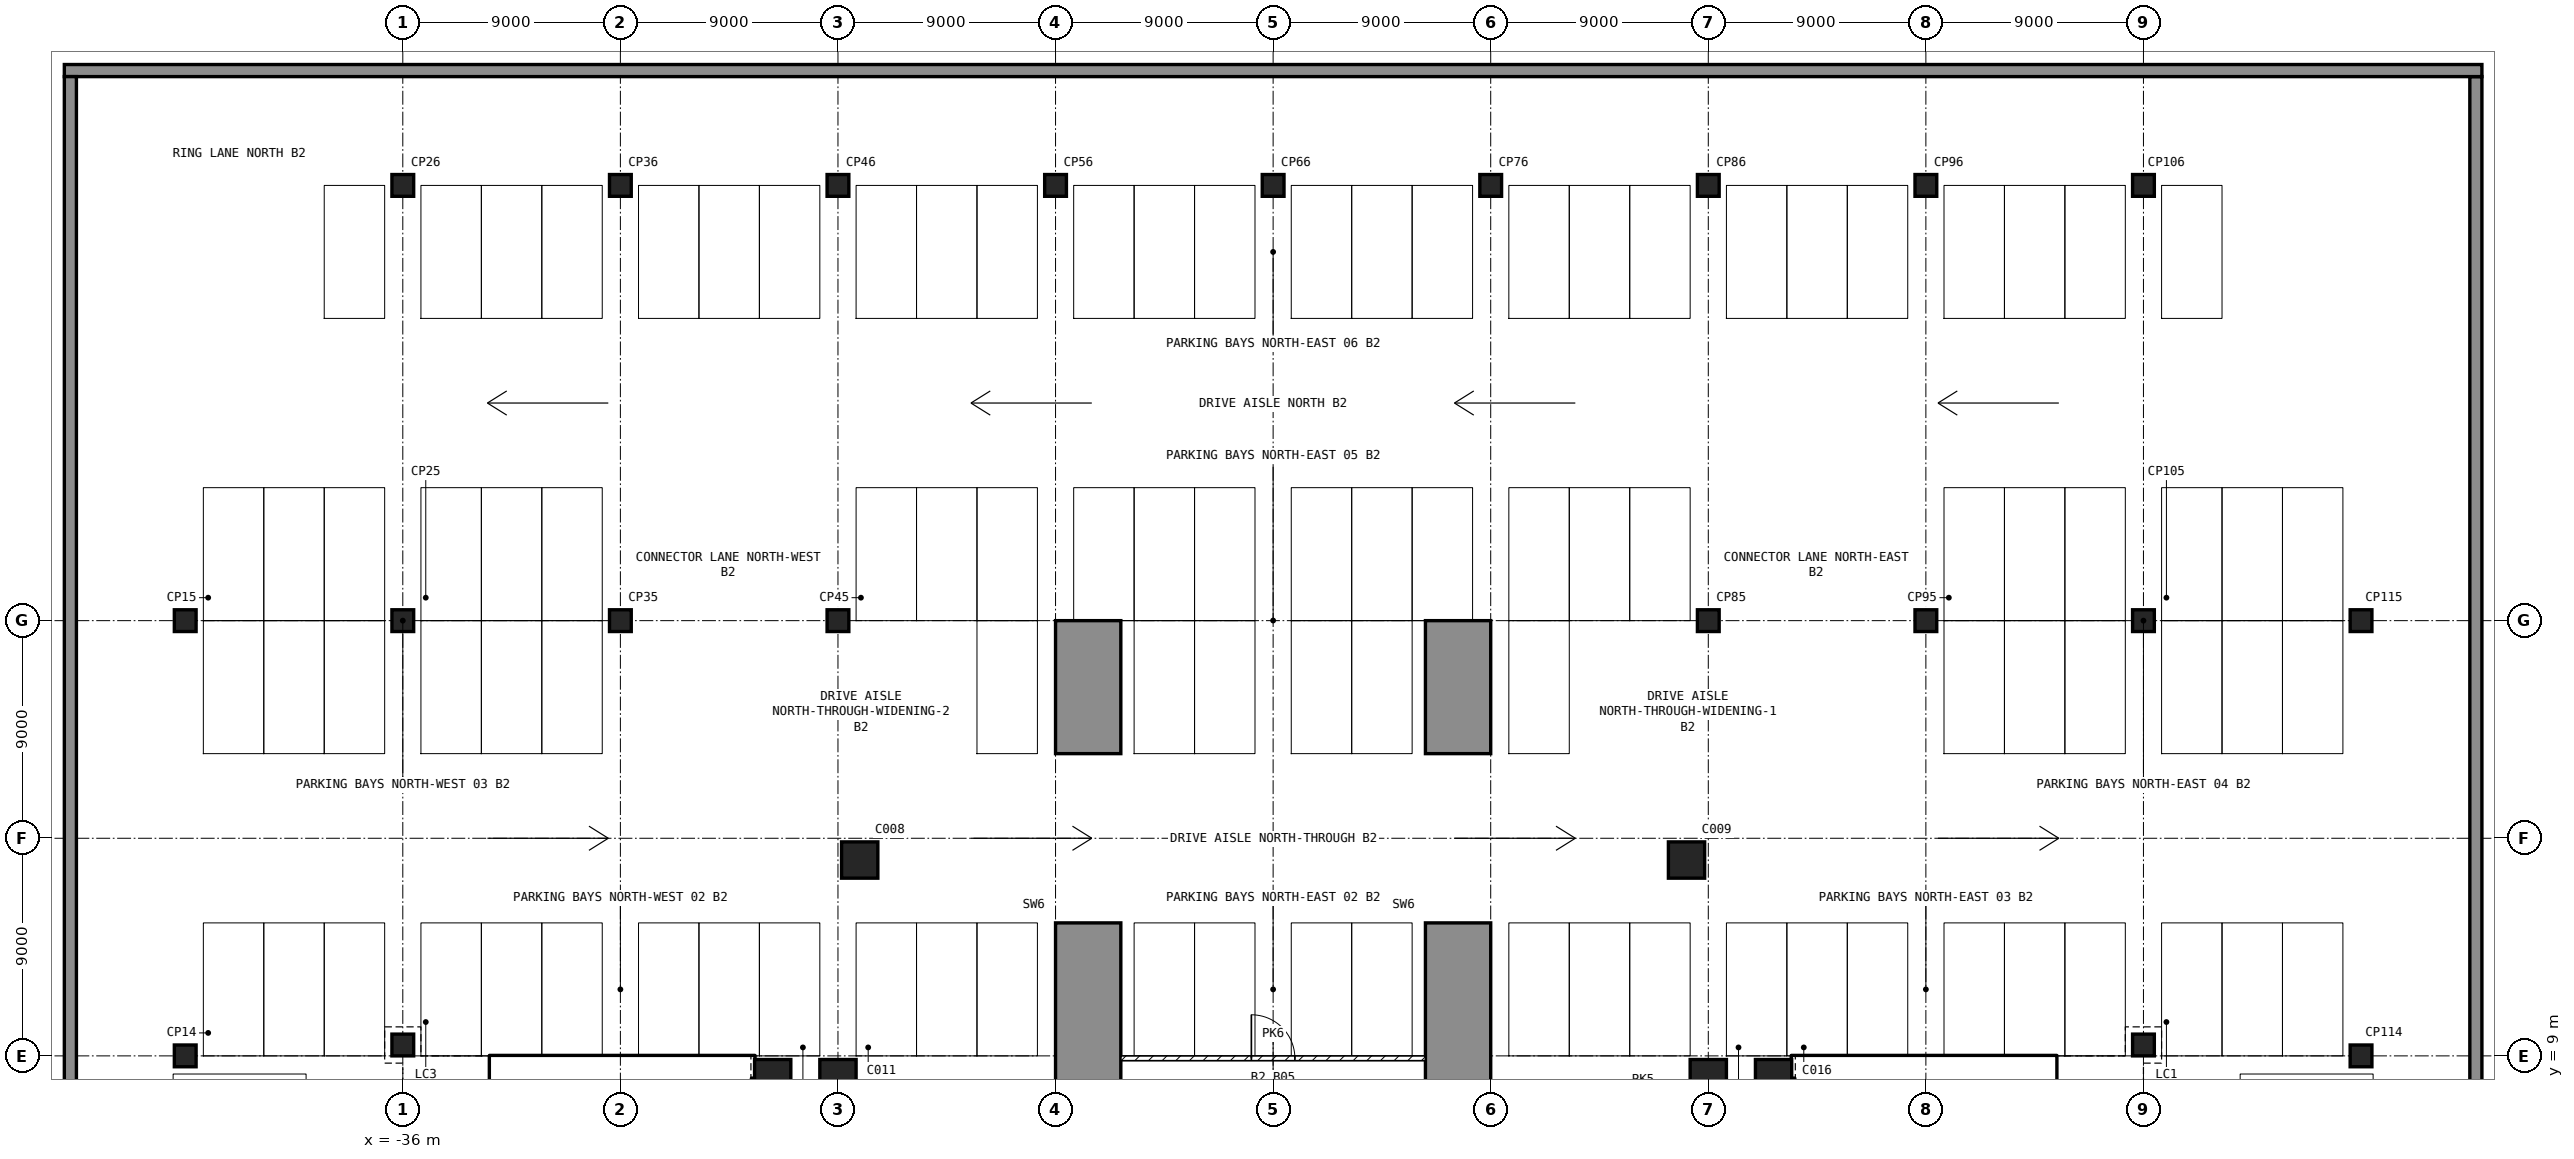
"""IFC4 building model, lengths in metres.
Left out: names, types, materials, properties, quantities, classifications, styles, units other than length and angle.
Written with IfcOpenShell. Run it as: python <this file> out.ifc"""

import sys

from ifc_helpers import new_model, si_unit, direction, frame, frame_2d, origin, origin_2d, place, context, subcontext, project, spatial, polyline, rectangle, outline, extrude, element, fill, save


model = new_model("IFC4")
c1 = context("Model", 3, precision=1e-05, world=origin(), true_north=direction((0.0, 1.0)))
c2 = subcontext(c1, "Body", "Model", "MODEL_VIEW")
j1 = project(units=[si_unit("LENGTHUNIT", "METRE"), si_unit("PLANEANGLEUNIT", "RADIAN")], contexts=[c1])
p1 = place(None, origin())
s1 = spatial("IfcSite", under=j1, at=p1, CompositionType="ELEMENT")
p2 = place(p1, origin())
s2 = spatial("IfcBuilding", under=s1, at=p2, CompositionType="ELEMENT")
p3 = place(p2, frame((0.0, 0.0, -8.7)))
s3 = spatial("IfcBuildingStorey", under=s2, at=p3, CompositionType="ELEMENT", Elevation=-8.7)
p4 = place(p3, frame((-50.0, 49.75, -0.3), z_axis=(0.0, 0.0, 1.0), x_axis=(1.0, 0.0, 0.0)))
e1 = element("IfcWall", 1, at=p4, inside=s3, PredefinedType="SOLIDWALL", context=c2, shape_type="SweptSolid", body=[
    extrude(rectangle(XDim=100.0, YDim=0.5, at=frame_2d((50.0, 0.0))), origin(), (0.0, 0.0, 1.0), 4.2),
])
for number, where, z_axis, x_axis in (
    (2, (49.75, -49.5, -0.3), (0.0, 0.0, 1.0), (0.0, 1.0, 0.0)),
    (3, (-49.75, -49.5, -0.3), (0.0, 0.0, 1.0), (0.0, 1.0, 0.0)),
):
    element("IfcWall", number, at=place(p3, frame(where, z_axis=z_axis, x_axis=x_axis)), inside=s3, PredefinedType="SOLIDWALL", context=c2, shape_type="SweptSolid", body=[
        extrude(rectangle(XDim=99.0, YDim=0.5, at=frame_2d((49.5, 0.0))), origin(), (0.0, 0.0, 1.0), 4.2),
    ])
for number, where, z_axis, x_axis in (
    (4, (-20.7, 8.1, -0.3), (0.0, 0.0, 1.0), (1.0, 0.0, 0.0)),
    (5, (-18.0, 8.1, -0.3), (0.0, 0.0, 1.0), (1.0, 0.0, 0.0)),
    (6, (18.0, 8.1, -0.3), (0.0, 0.0, 1.0), (1.0, 0.0, 0.0)),
    (7, (20.7, 8.1, -0.3), (0.0, 0.0, 1.0), (1.0, 0.0, 0.0)),
    (8, (17.1, 17.1, -0.3), (0.0, 0.0, 1.0), (1.0, 0.0, 0.0)),
    (9, (-17.1, 17.1, -0.3), (0.0, 0.0, 1.0), (1.0, 0.0, 0.0)),
):
    element("IfcColumn", number, at=place(p3, frame(where, z_axis=z_axis, x_axis=x_axis)), inside=s3, PredefinedType="COLUMN", context=c2, shape_type="SweptSolid", body=[
        extrude(rectangle(XDim=1.5, YDim=1.5, at=origin_2d()), origin(), (0.0, 0.0, 1.0), 4.2),
    ])
for number, where, z_axis, x_axis in (
    (10, (-45.0, 9.0, -0.3), (0.0, 0.0, 1.0), (1.0, 0.0, 0.0)),
    (11, (-45.0, 27.0, -0.3), (0.0, 0.0, 1.0), (1.0, 0.0, 0.0)),
    (12, (-36.0, 27.0, -0.3), (0.0, 0.0, 1.0), (1.0, 0.0, 0.0)),
    (13, (-36.0, 45.0, -0.3), (0.0, 0.0, 1.0), (1.0, 0.0, 0.0)),
    (14, (-27.0, 27.0, -0.3), (0.0, 0.0, 1.0), (1.0, 0.0, 0.0)),
    (15, (-27.0, 45.0, -0.3), (0.0, 0.0, 1.0), (1.0, 0.0, 0.0)),
    (16, (-18.0, 27.0, -0.3), (0.0, 0.0, 1.0), (1.0, 0.0, 0.0)),
    (17, (-18.0, 45.0, -0.3), (0.0, 0.0, 1.0), (1.0, 0.0, 0.0)),
    (18, (-9.0, 45.0, -0.3), (0.0, 0.0, 1.0), (1.0, 0.0, 0.0)),
    (19, (0.0, 45.0, -0.3), (0.0, 0.0, 1.0), (1.0, 0.0, 0.0)),
    (20, (9.0, 45.0, -0.3), (0.0, 0.0, 1.0), (1.0, 0.0, 0.0)),
    (21, (18.0, 27.0, -0.3), (0.0, 0.0, 1.0), (1.0, 0.0, 0.0)),
    (22, (18.0, 45.0, -0.3), (0.0, 0.0, 1.0), (1.0, 0.0, 0.0)),
    (23, (27.0, 27.0, -0.3), (0.0, 0.0, 1.0), (1.0, 0.0, 0.0)),
    (24, (27.0, 45.0, -0.3), (0.0, 0.0, 1.0), (1.0, 0.0, 0.0)),
    (25, (36.0, 27.0, -0.3), (0.0, 0.0, 1.0), (1.0, 0.0, 0.0)),
    (26, (36.0, 45.0, -0.3), (0.0, 0.0, 1.0), (1.0, 0.0, 0.0)),
    (27, (45.0, 9.0, -0.3), (0.0, 0.0, 1.0), (1.0, 0.0, 0.0)),
    (28, (45.0, 27.0, -0.3), (0.0, 0.0, 1.0), (1.0, 0.0, 0.0)),
    (29, (36.0, 9.45, -0.3), (0.0, 0.0, 1.0), (1.0, 0.0, 0.0)),
    (30, (-36.0, 9.45, -0.3), (0.0, 0.0, 1.0), (1.0, 0.0, 0.0)),
):
    element("IfcColumn", number, at=place(p3, frame(where, z_axis=z_axis, x_axis=x_axis)), inside=s3, PredefinedType="COLUMN", context=c2, shape_type="SweptSolid", body=[
        extrude(rectangle(XDim=0.9, YDim=0.9, at=origin_2d()), origin(), (0.0, 0.0, 1.0), 4.2),
    ])
for number, where, z_axis, x_axis in (
    (31, (6.3, 3.5, -0.3), (1.0, 0.0, 0.0), (0.0, 1.0, 0.0)),
    (32, (-9.0, 3.5, -0.3), (1.0, 0.0, 0.0), (0.0, 1.0, 0.0)),
):
    element("IfcWall", number, at=place(p3, frame(where, z_axis=z_axis, x_axis=x_axis)), inside=s3, PredefinedType="SOLIDWALL", context=c2, shape_type="SweptSolid", body=[
        extrude(outline(polyline([(0.0, 0.0), (11.0, 0.0), (11.0, 3.3), (18.0, 3.3), (18.0, 0.0), (23.5, 0.0), (23.5, 4.2), (0.0, 4.2), (0.0, 0.0)])), origin(), (0.0, 0.0, 1.0), 2.7),
    ])
p5 = place(p3, frame((31.95, 7.2, 0.0), z_axis=(0.0, 0.0, 1.0), x_axis=(0.0, 1.0, 0.0)))
e33 = element("IfcWall", 33, at=p5, inside=s3, PredefinedType="SHEAR", context=c2, shape_type="SweptSolid", body=[
    extrude(rectangle(XDim=1.8, YDim=0.9, at=frame_2d((0.9, 0.0))), origin(), (0.0, 0.0, 1.0), 3.9),
])
p6 = place(p3, frame((21.45, 8.55, 0.0), z_axis=(0.0, 0.0, 1.0), x_axis=(1.0, 0.0, 0.0)))
e34 = element("IfcWall", 34, at=p6, inside=s3, PredefinedType="SHEAR", context=c2, shape_type="SweptSolid", body=[
    extrude(rectangle(XDim=10.05, YDim=0.9, at=frame_2d((5.025, 0.0))), origin(), (0.0, 0.0, 1.0), 3.9),
])
p7 = place(p3, frame((21.825, 1.2, 0.0), z_axis=(0.0, 0.0, 1.0), x_axis=(0.0, 1.0, 0.0)))
e35 = element("IfcWall", 35, at=p7, inside=s3, PredefinedType="SHEAR", context=c2, shape_type="SweptSolid", body=[
    extrude(rectangle(XDim=6.9, YDim=0.45, at=frame_2d((3.45, 0.0))), origin(), (0.0, 0.0, 1.0), 3.9),
])
p8 = place(p3, frame((28.25, 5.25, 0.0), z_axis=(0.0, 0.0, 1.0), x_axis=(0.0, 1.0, 0.0)))
e36 = element("IfcWall", 36, at=p8, inside=s3, PredefinedType="SOLIDWALL", context=c2, shape_type="SweptSolid", body=[
    extrude(rectangle(XDim=2.85, YDim=0.2, at=frame_2d((1.425, 0.0))), origin(), (0.0, 0.0, 1.0), 3.9),
])
p9 = place(p3, frame((-31.95, 7.2, 0.0), z_axis=(0.0, 0.0, 1.0), x_axis=(0.0, 1.0, 0.0)))
e37 = element("IfcWall", 37, at=p9, inside=s3, PredefinedType="SHEAR", context=c2, shape_type="SweptSolid", body=[
    extrude(rectangle(XDim=1.8, YDim=0.9, at=frame_2d((0.9, 0.0))), origin(), (0.0, 0.0, 1.0), 3.9),
])
p10 = place(p3, frame((-31.5, 8.55, 0.0), z_axis=(0.0, 0.0, 1.0), x_axis=(1.0, 0.0, 0.0)))
e38 = element("IfcWall", 38, at=p10, inside=s3, PredefinedType="SHEAR", context=c2, shape_type="SweptSolid", body=[
    extrude(rectangle(XDim=10.05, YDim=0.9, at=frame_2d((5.025, 0.0))), origin(), (0.0, 0.0, 1.0), 3.9),
])
p11 = place(p3, frame((-21.825, 1.2, 0.0), z_axis=(0.0, 0.0, 1.0), x_axis=(0.0, 1.0, 0.0)))
e39 = element("IfcWall", 39, at=p11, inside=s3, PredefinedType="SHEAR", context=c2, shape_type="SweptSolid", body=[
    extrude(rectangle(XDim=6.9, YDim=0.45, at=frame_2d((3.45, 0.0))), origin(), (0.0, 0.0, 1.0), 3.9),
])
p12 = place(p3, frame((-28.25, 5.25, 0.0), z_axis=(0.0, 0.0, 1.0), x_axis=(0.0, 1.0, 0.0)))
e40 = element("IfcWall", 40, at=p12, inside=s3, PredefinedType="SOLIDWALL", context=c2, shape_type="SweptSolid", body=[
    extrude(rectangle(XDim=2.85, YDim=0.2, at=frame_2d((1.425, 0.0))), origin(), (0.0, 0.0, 1.0), 3.9),
])
p13 = place(p3, frame((-6.3, 8.9, 0.0), z_axis=(0.0, 0.0, 1.0), x_axis=(1.0, 0.0, 0.0)))
e41 = element("IfcWall", 41, at=p13, inside=s3, PredefinedType="PARTITIONING", context=c2, shape_type="SweptSolid", body=[
    extrude(rectangle(XDim=12.6, YDim=0.2, at=frame_2d((6.3, 0.0))), origin(), (0.0, 0.0, 1.0), 3.9),
])
p14 = place(p13, frame((5.4, 0.0, 0.0)))
e42 = element("IfcOpeningElement", 42, at=p14, cuts=e41, PredefinedType="OPENING", context=c2, shape_type="SweptSolid", body=[
    extrude(rectangle(XDim=1.8, YDim=2.1, at=frame_2d((0.9, 1.05))), frame((0.0, 0.11, 0.0), z_axis=(0.0, -1.0, 0.0), x_axis=(1.0, 0.0, 0.0)), (0.0, 0.0, 1.0), 0.22),
])
p15 = place(p14, origin())
e43 = element("IfcDoor", 43, at=p15, inside=s3, OperationType="SINGLE_SWING_LEFT", PredefinedType="DOOR", context=c2, shape_type="SweptSolid", body=[
    extrude(rectangle(XDim=1.8, YDim=2.1, at=frame_2d((0.9, 1.05))), frame((0.0, 0.025, 0.0), z_axis=(0.0, -1.0, 0.0), x_axis=(1.0, 0.0, 0.0)), (0.0, 0.0, 1.0), 0.05),
])
fill(e42, e43)
save(model, sys.argv[1])
